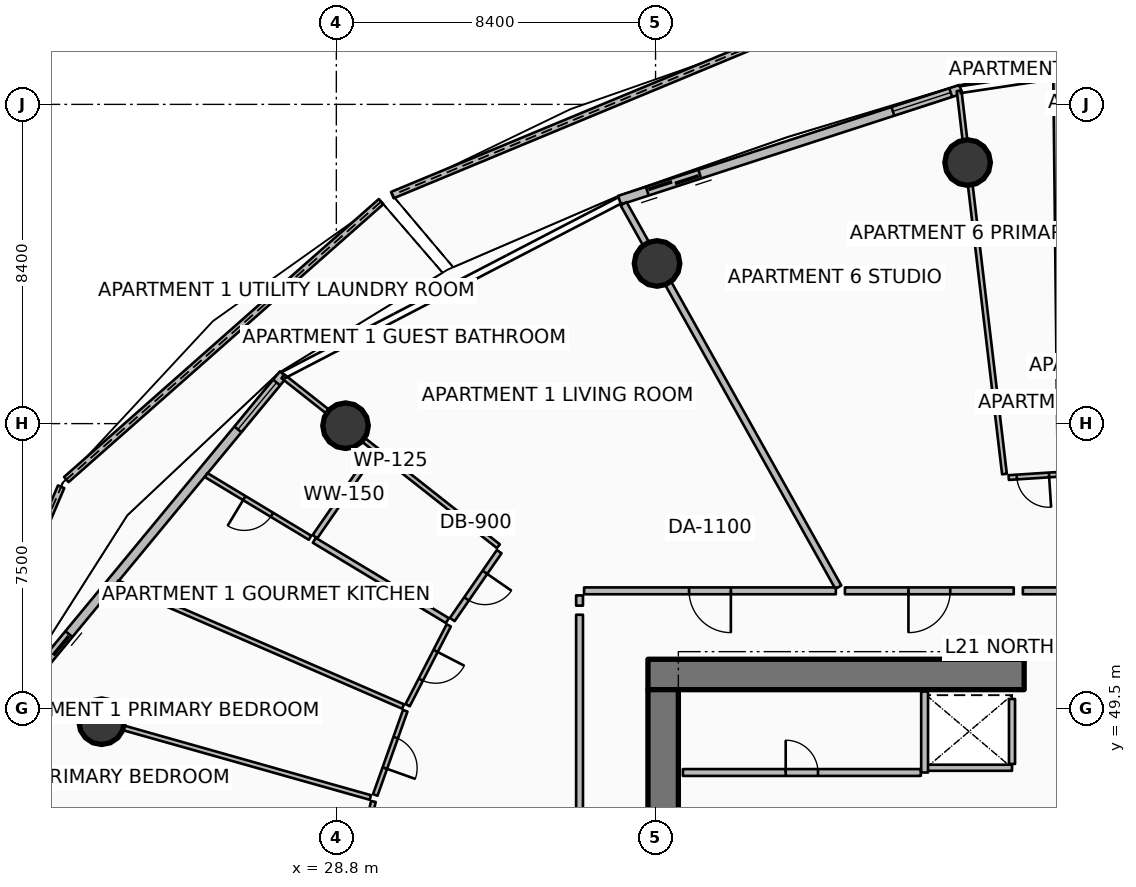
"""IFC4 building model, lengths in metres.
Left out: names, types, materials, properties, quantities, classifications, styles, units other than length and angle.
Written with IfcOpenShell. Run it as: python <this file> out.ifc"""

import sys

from ifc_helpers import new_model, si_unit, direction, frame, frame_2d, origin, origin_2d, place, context, subcontext, project, spatial, polyline, rectangle, circle, outline, extrude, element, fill, save


model = new_model("IFC4")
c1 = context("Model", 3, precision=1e-05, world=origin(), true_north=direction((0.0, 1.0)))
c2 = subcontext(c1, "Body", "Model", "MODEL_VIEW")
j1 = project(units=[si_unit("LENGTHUNIT", "METRE"), si_unit("PLANEANGLEUNIT", "RADIAN")], contexts=[c1])
p1 = place(None, origin())
s1 = spatial("IfcSite", under=j1, at=p1, CompositionType="ELEMENT")
p2 = place(p1, origin())
s2 = spatial("IfcBuilding", under=s1, at=p2, CompositionType="ELEMENT")
p3 = place(p2, frame((0.0, 0.0, 86.4)))
s3 = spatial("IfcBuildingStorey", under=s2, at=p3, CompositionType="ELEMENT", Elevation=86.4)
p4 = place(p3, frame((37.0, 50.4, 0.0), z_axis=(0.0, 0.0, 1.0), x_axis=(1.0, 0.0, 0.0)))
e1 = element("IfcWall", 1, at=p4, inside=s3, PredefinedType="SHEAR", context=c2, shape_type="SweptSolid", body=[
    extrude(rectangle(XDim=9.9, YDim=0.8, at=frame_2d((4.95, 0.0))), origin(), (0.0, 0.0, 1.0), 3.75),
])
p5 = place(p3, frame((37.4, 34.0, 0.0), z_axis=(0.0, 0.0, 1.0), x_axis=(0.0, 1.0, 0.0)))
e2 = element("IfcWall", 2, at=p5, inside=s3, PredefinedType="SHEAR", context=c2, shape_type="SweptSolid", body=[
    extrude(rectangle(XDim=16.0, YDim=0.8, at=frame_2d((8.0, 0.0))), origin(), (0.0, 0.0, 1.0), 3.75),
])
for number, where, z_axis, x_axis in (
    (3, (45.412, 63.869, 0.0), (0.0, 0.0, 1.0), (1.0, 0.0, 0.0)),
    (4, (37.24, 61.214, 0.0), (0.0, 0.0, 1.0), (1.0, 0.0, 0.0)),
    (5, (29.042, 56.945, 0.0), (0.0, 0.0, 1.0), (1.0, 0.0, 0.0)),
    (6, (22.623, 49.157, 0.0), (0.0, 0.0, 1.0), (1.0, 0.0, 0.0)),
):
    element("IfcColumn", number, at=place(p3, frame(where, z_axis=z_axis, x_axis=x_axis)), inside=s3, PredefinedType="COLUMN", context=c2, shape_type="SweptSolid", body=[
        extrude(circle(Radius=0.6, at=origin_2d()), origin(), (0.0, 0.0, 1.0), 3.5),
    ])
p6 = place(p3, frame((39.767, 66.95, 0.0), z_axis=(0.0, 0.0, 1.0), x_axis=(-0.92370541506, -0.383103518894, 0.0)))
e7 = element("IfcWall", 7, at=p6, inside=s3, PredefinedType="PARAPET", context=c2, shape_type="SweptSolid", body=[
    extrude(outline(polyline([(0.0, 0.0), (10.277, 0.0), (10.277, 1.756), (5.139, 1.853), (0.0, 1.832), (0.0, 0.0)])), frame((0.0, 0.09, 0.0), z_axis=(0.0, -1.0, 0.0), x_axis=(1.0, 0.0, 0.0)), (0.0, 0.0, 1.0), 0.18),
])
p7 = place(p3, frame((29.978, 62.842, 0.0), z_axis=(0.0, 0.0, 1.0), x_axis=(-0.749623748339, -0.661864212604, 0.0)))
e8 = element("IfcWall", 8, at=p7, inside=s3, PredefinedType="PARAPET", context=c2, shape_type="SweptSolid", body=[
    extrude(outline(polyline([(0.0, 0.0), (11.05, 0.0), (11.05, 1.348), (5.525, 1.562), (0.0, 1.747), (0.0, 0.0)])), frame((0.0, 0.09, 0.0), z_axis=(0.0, -1.0, 0.0), x_axis=(1.0, 0.0, 0.0)), (0.0, 0.0, 1.0), 0.18),
])
p8 = place(p3, frame((21.558, 55.338, 0.0), z_axis=(0.0, 0.0, 1.0), x_axis=(-0.391761113394, -0.920066970406, 0.0)))
e9 = element("IfcWall", 9, at=p8, inside=s3, PredefinedType="PARAPET", context=c2, shape_type="SweptSolid", body=[
    extrude(outline(polyline([(0.0, 0.0), (11.638, 0.0), (11.638, 1.12), (5.819, 1.182), (0.0, 1.348), (0.0, 0.0)])), frame((0.0, 0.09, 0.0), z_axis=(0.0, -1.0, 0.0), x_axis=(1.0, 0.0, 0.0)), (0.0, 0.0, 1.0), 0.18),
])
p9 = place(p3, frame((45.233, 65.797, 0.0), z_axis=(0.0, 0.0, 1.0), x_axis=(-0.951052494852, -0.30902937083, 0.0)))
e10 = element("IfcWall", 10, at=p9, inside=s3, PredefinedType="SOLIDWALL", context=c2, shape_type="SweptSolid", body=[
    extrude(rectangle(XDim=9.444, YDim=0.24, at=frame_2d((4.722, 0.0))), origin(), (0.0, 0.0, 1.0), 2.45),
])
p10 = place(p9, frame((7.224, 0.0, 0.0)))
e11 = element("IfcOpeningElement", 11, at=p10, cuts=e10, PredefinedType="OPENING", context=c2, shape_type="SweptSolid", body=[
    extrude(rectangle(XDim=1.45, YDim=2.15, at=frame_2d((0.725, 1.075))), frame((0.0, 0.13, 0.0), z_axis=(0.0, -1.0, 0.0), x_axis=(1.0, 0.0, 0.0)), (0.0, 0.0, 1.0), 0.26),
])
p11 = place(p9, frame((0.28, 0.0, 0.65)))
e12 = element("IfcOpeningElement", 12, at=p11, cuts=e10, PredefinedType="OPENING", context=c2, shape_type="SweptSolid", body=[
    extrude(rectangle(XDim=1.6, YDim=1.5, at=frame_2d((0.8, 0.75))), frame((0.0, 0.13, 0.0), z_axis=(0.0, -1.0, 0.0), x_axis=(1.0, 0.0, 0.0)), (0.0, 0.0, 1.0), 0.26),
])
p12 = place(p3, frame((27.407, 58.298, 0.0), z_axis=(0.0, 0.0, 1.0), x_axis=(-0.636704975, -0.771107498868, 0.0)))
e13 = element("IfcWall", 13, at=p12, inside=s3, PredefinedType="SOLIDWALL", context=c2, shape_type="SweptSolid", body=[
    extrude(rectangle(XDim=11.084, YDim=0.24, at=frame_2d((5.542, 0.0))), origin(), (0.0, 0.0, 1.0), 2.45),
])
p13 = place(p12, frame((8.864, 0.0, 0.0)))
e14 = element("IfcOpeningElement", 14, at=p13, cuts=e13, PredefinedType="OPENING", context=c2, shape_type="SweptSolid", body=[
    extrude(rectangle(XDim=1.45, YDim=2.15, at=frame_2d((0.725, 1.075))), frame((0.0, 0.13, 0.0), z_axis=(0.0, -1.0, 0.0), x_axis=(1.0, 0.0, 0.0)), (0.0, 0.0, 1.0), 0.26),
])
p14 = place(p12, frame((0.28, 0.0, 0.65)))
e15 = element("IfcOpeningElement", 15, at=p14, cuts=e13, PredefinedType="OPENING", context=c2, shape_type="SweptSolid", body=[
    extrude(rectangle(XDim=1.6, YDim=1.5, at=frame_2d((0.8, 0.75))), frame((0.0, 0.13, 0.0), z_axis=(0.0, -1.0, 0.0), x_axis=(1.0, 0.0, 0.0)), (0.0, 0.0, 1.0), 0.26),
])
p15 = place(p3, frame((46.58, 47.945, 0.0), z_axis=(0.0, 0.0, 1.0), x_axis=(-1.0, 0.0, 0.0)))
e16 = element("IfcWall", 16, at=p15, inside=s3, PredefinedType="PARTITIONING", context=c2, shape_type="SweptSolid", body=[
    extrude(rectangle(XDim=2.26, YDim=0.16, at=frame_2d((1.13, 0.0))), origin(), (0.0, 0.0, 1.0), 3.5),
])
p16 = place(p3, frame((46.58, 48.045, 0.0), z_axis=(0.0, 0.0, 1.0), x_axis=(0.0, 1.0, 0.0)))
e17 = element("IfcWall", 17, at=p16, inside=s3, PredefinedType="PARTITIONING", context=c2, shape_type="SweptSolid", body=[
    extrude(rectangle(XDim=1.71, YDim=0.16, at=frame_2d((0.855, 0.0))), origin(), (0.0, 0.0, 1.0), 3.5),
])
p17 = place(p3, frame((37.92, 47.82, 0.0), z_axis=(0.0, 0.0, 1.0), x_axis=(1.0, 0.0, 0.0)))
e18 = element("IfcWall", 18, at=p17, inside=s3, PredefinedType="PARTITIONING", context=c2, shape_type="SweptSolid", body=[
    extrude(rectangle(XDim=6.26, YDim=0.18, at=frame_2d((3.13, 0.0))), origin(), (0.0, 0.0, 1.0), 3.5),
])
p18 = place(p17, frame((2.705, 0.0, 0.0)))
e19 = element("IfcOpeningElement", 19, at=p18, cuts=e18, PredefinedType="OPENING", context=c2, shape_type="SweptSolid", body=[
    extrude(rectangle(XDim=0.85, YDim=2.06, at=frame_2d((0.425, 1.03))), frame((0.0, 0.1, 0.0), z_axis=(0.0, -1.0, 0.0), x_axis=(1.0, 0.0, 0.0)), (0.0, 0.0, 1.0), 0.2),
])
p19 = place(p3, frame((44.28, 47.82, 0.0), z_axis=(0.0, 0.0, 1.0), x_axis=(0.0, 1.0, 0.0)))
e20 = element("IfcWall", 20, at=p19, inside=s3, PredefinedType="PARTITIONING", context=c2, shape_type="SweptSolid", body=[
    extrude(rectangle(XDim=2.13, YDim=0.18, at=frame_2d((1.065, 0.0))), origin(), (0.0, 0.0, 1.0), 3.5),
])
p20 = place(p3, frame((42.01, 52.696, 0.0), z_axis=(0.0, 0.0, 1.0), x_axis=(-0.488628442553, 0.872491974249, 0.0)))
e21 = element("IfcWall", 21, at=p20, inside=s3, PredefinedType="PARTITIONING", context=c2, shape_type="SweptSolid", body=[
    extrude(rectangle(XDim=11.563, YDim=0.18, at=frame_2d((5.782, 0.0))), origin(), (0.0, 0.0, 1.0), 2.94),
])
p21 = place(p3, frame((41.944, 52.6, 0.0), z_axis=(0.0, 0.0, 1.0), x_axis=(-1.0, 0.0, 0.0)))
e22 = element("IfcWall", 22, at=p21, inside=s3, PredefinedType="PARTITIONING", context=c2, shape_type="SweptSolid", body=[
    extrude(rectangle(XDim=6.624, YDim=0.18, at=frame_2d((3.312, 0.0))), origin(), (0.0, 0.0, 1.0), 2.94),
])
p22 = place(p21, frame((2.762, 0.0, 0.0)))
e23 = element("IfcOpeningElement", 23, at=p22, cuts=e22, PredefinedType="OPENING", context=c2, shape_type="SweptSolid", body=[
    extrude(rectangle(XDim=1.1, YDim=2.1, at=frame_2d((0.55, 1.05))), frame((0.0, 0.1, 0.0), z_axis=(0.0, -1.0, 0.0), x_axis=(1.0, 0.0, 0.0)), (0.0, 0.0, 1.0), 0.2),
])
p23 = place(p3, frame((35.2, 52.48, 0.0), z_axis=(0.0, 0.0, 1.0), x_axis=(0.0, -1.0, 0.0)))
e24 = element("IfcWall", 24, at=p23, inside=s3, PredefinedType="PARTITIONING", context=c2, shape_type="SweptSolid", body=[
    extrude(rectangle(XDim=0.269, YDim=0.18, at=frame_2d((0.135, 0.0))), origin(), (0.0, 0.0, 1.0), 2.94),
])
p24 = place(p3, frame((35.2, 51.971, 0.0), z_axis=(0.0, 0.0, 1.0), x_axis=(0.0, -1.0, 0.0)))
e25 = element("IfcWall", 25, at=p24, inside=s3, PredefinedType="PARTITIONING", context=c2, shape_type="SweptSolid", body=[
    extrude(rectangle(XDim=6.241, YDim=0.18, at=frame_2d((3.12, 0.0))), origin(), (0.0, 0.0, 1.0), 2.94),
])
p25 = place(p3, frame((33.064, 53.774, 0.0), z_axis=(0.0, 0.0, 1.0), x_axis=(-0.785299836557, 0.61911563274, 0.0)))
e26 = element("IfcWall", 26, at=p25, inside=s3, PredefinedType="PARTITIONING", context=c2, shape_type="SweptSolid", body=[
    extrude(rectangle(XDim=7.219, YDim=0.125, at=frame_2d((3.61, 0.0))), origin(), (0.0, 0.0, 1.0), 2.94),
])
p26 = place(p3, frame((33.086, 53.63, 0.0), z_axis=(0.0, 0.0, 1.0), x_axis=(-0.568917555875, -0.822394561398, 0.0)))
e27 = element("IfcWall", 27, at=p26, inside=s3, PredefinedType="PARTITIONING", context=c2, shape_type="SweptSolid", body=[
    extrude(rectangle(XDim=2.171, YDim=0.15, at=frame_2d((1.085, 0.0))), origin(), (0.0, 0.0, 1.0), 2.94),
])
p27 = place(p26, frame((0.66, 0.0, 0.0)))
e28 = element("IfcOpeningElement", 28, at=p27, cuts=e27, PredefinedType="OPENING", context=c2, shape_type="SweptSolid", body=[
    extrude(rectangle(XDim=0.85, YDim=2.06, at=frame_2d((0.425, 1.03))), frame((0.0, 0.085, 0.0), z_axis=(0.0, -1.0, 0.0), x_axis=(1.0, 0.0, 0.0)), (0.0, 0.0, 1.0), 0.17),
])
p28 = place(p3, frame((29.772, 56.243, 0.0), z_axis=(0.0, 0.0, 1.0), x_axis=(-0.568904038121, -0.822403912569, 0.0)))
e29 = element("IfcWall", 29, at=p28, inside=s3, PredefinedType="PARTITIONING", context=c2, shape_type="SweptSolid", body=[
    extrude(rectangle(XDim=2.698, YDim=0.15, at=frame_2d((1.349, 0.0))), origin(), (0.0, 0.0, 1.0), 2.94),
])
p29 = place(p3, frame((31.722, 51.817, 0.0), z_axis=(0.0, 0.0, 1.0), x_axis=(-0.856305556185, 0.516469548422, 0.0)))
e30 = element("IfcWall", 30, at=p29, inside=s3, PredefinedType="PARTITIONING", context=c2, shape_type="SweptSolid", body=[
    extrude(rectangle(XDim=4.09, YDim=0.15, at=frame_2d((2.045, 0.0))), origin(), (0.0, 0.0, 1.0), 2.94),
])
p30 = place(p3, frame((28.109, 53.997, 0.0), z_axis=(0.0, 0.0, 1.0), x_axis=(-0.856309036054, 0.516463778761, 0.0)))
e31 = element("IfcWall", 31, at=p30, inside=s3, PredefinedType="PARTITIONING", context=c2, shape_type="SweptSolid", body=[
    extrude(rectangle(XDim=3.19, YDim=0.125, at=frame_2d((1.595, 0.0))), origin(), (0.0, 0.0, 1.0), 2.94),
])
p31 = place(p30, frame((1.17, 0.0, 0.0)))
e32 = element("IfcOpeningElement", 32, at=p31, cuts=e31, PredefinedType="OPENING", context=c2, shape_type="SweptSolid", body=[
    extrude(rectangle(XDim=0.85, YDim=2.06, at=frame_2d((0.425, 1.03))), frame((0.0, 0.073, 0.0), z_axis=(0.0, -1.0, 0.0), x_axis=(1.0, 0.0, 0.0)), (0.0, 0.0, 1.0), 0.145),
])
p32 = place(p3, frame((30.557, 49.556, 0.0), z_axis=(0.0, 0.0, 1.0), x_axis=(-0.917609944695, 0.39748206173, 0.0)))
e33 = element("IfcWall", 33, at=p32, inside=s3, PredefinedType="PARTITIONING", context=c2, shape_type="SweptSolid", body=[
    extrude(rectangle(XDim=8.197, YDim=0.125, at=frame_2d((4.099, 0.0))), origin(), (0.0, 0.0, 1.0), 2.94),
])
p33 = place(p3, frame((31.758, 51.691, 0.0), z_axis=(0.0, 0.0, 1.0), x_axis=(-0.458055610994, -0.888923538465, 0.0)))
e34 = element("IfcWall", 34, at=p33, inside=s3, PredefinedType="PARTITIONING", context=c2, shape_type="SweptSolid", body=[
    extrude(rectangle(XDim=2.362, YDim=0.125, at=frame_2d((1.181, 0.0))), origin(), (0.0, 0.0, 1.0), 2.94),
])
p34 = place(p33, frame((0.756, 0.0, 0.0)))
e35 = element("IfcOpeningElement", 35, at=p34, cuts=e34, PredefinedType="OPENING", context=c2, shape_type="SweptSolid", body=[
    extrude(rectangle(XDim=0.85, YDim=2.06, at=frame_2d((0.425, 1.03))), frame((0.0, 0.073, 0.0), z_axis=(0.0, -1.0, 0.0), x_axis=(1.0, 0.0, 0.0)), (0.0, 0.0, 1.0), 0.145),
])
p35 = place(p3, frame((30.613, 49.445, 0.0), z_axis=(0.0, 0.0, 1.0), x_axis=(-0.335316857021, -0.94210541098, 0.0)))
e36 = element("IfcWall", 36, at=p35, inside=s3, PredefinedType="PARTITIONING", context=c2, shape_type="SweptSolid", body=[
    extrude(rectangle(XDim=2.352, YDim=0.125, at=frame_2d((1.176, 0.0))), origin(), (0.0, 0.0, 1.0), 2.94),
])
p36 = place(p35, frame((0.751, 0.0, 0.0)))
e37 = element("IfcOpeningElement", 37, at=p36, cuts=e36, PredefinedType="OPENING", context=c2, shape_type="SweptSolid", body=[
    extrude(rectangle(XDim=0.85, YDim=2.06, at=frame_2d((0.425, 1.03))), frame((0.0, 0.073, 0.0), z_axis=(0.0, -1.0, 0.0), x_axis=(1.0, 0.0, 0.0)), (0.0, 0.0, 1.0), 0.145),
])
p37 = place(p3, frame((29.695, 47.163, 0.0), z_axis=(0.0, 0.0, 1.0), x_axis=(-0.962455839824, 0.271438310467, 0.0)))
e38 = element("IfcWall", 38, at=p37, inside=s3, PredefinedType="PARTITIONING", context=c2, shape_type="SweptSolid", body=[
    extrude(rectangle(XDim=9.552, YDim=0.125, at=frame_2d((4.776, 0.0))), origin(), (0.0, 0.0, 1.0), 2.94),
])
p38 = place(p3, frame((29.774, 47.057, 0.0), z_axis=(0.0, 0.0, 1.0), x_axis=(-0.210439442073, -0.977606895035, 0.0)))
e39 = element("IfcWall", 39, at=p38, inside=s3, PredefinedType="PARTITIONING", context=c2, shape_type="SweptSolid", body=[
    extrude(rectangle(XDim=2.216, YDim=0.125, at=frame_2d((1.108, 0.0))), origin(), (0.0, 0.0, 1.0), 2.94),
])
p39 = place(p38, frame((0.683, 0.0, 0.0)))
e40 = element("IfcOpeningElement", 40, at=p39, cuts=e39, PredefinedType="OPENING", context=c2, shape_type="SweptSolid", body=[
    extrude(rectangle(XDim=0.85, YDim=2.06, at=frame_2d((0.425, 1.03))), frame((0.0, 0.073, 0.0), z_axis=(0.0, -1.0, 0.0), x_axis=(1.0, 0.0, 0.0)), (0.0, 0.0, 1.0), 0.145),
])
p40 = place(p3, frame((46.625, 52.6, 0.0), z_axis=(0.0, 0.0, 1.0), x_axis=(-1.0, 0.0, 0.0)))
e41 = element("IfcWall", 41, at=p40, inside=s3, PredefinedType="PARTITIONING", context=c2, shape_type="SweptSolid", body=[
    extrude(rectangle(XDim=4.442, YDim=0.18, at=frame_2d((2.221, 0.0))), origin(), (0.0, 0.0, 1.0), 2.94),
])
p41 = place(p40, frame((1.671, 0.0, 0.0)))
e42 = element("IfcOpeningElement", 42, at=p41, cuts=e41, PredefinedType="OPENING", context=c2, shape_type="SweptSolid", body=[
    extrude(rectangle(XDim=1.1, YDim=2.1, at=frame_2d((0.55, 1.05))), frame((0.0, 0.1, 0.0), z_axis=(0.0, -1.0, 0.0), x_axis=(1.0, 0.0, 0.0)), (0.0, 0.0, 1.0), 0.2),
])
p42 = place(p3, frame((50.869, 52.6, 0.0), z_axis=(0.0, 0.0, 1.0), x_axis=(-1.0, 0.0, 0.0)))
e43 = element("IfcWall", 43, at=p42, inside=s3, PredefinedType="PARTITIONING", context=c2, shape_type="SweptSolid", body=[
    extrude(rectangle(XDim=4.004, YDim=0.18, at=frame_2d((2.002, 0.0))), origin(), (0.0, 0.0, 1.0), 2.94),
])
p43 = place(p3, frame((46.382, 55.674, 0.0), z_axis=(0.0, 0.0, 1.0), x_axis=(-0.117533197276, 0.99306895407, 0.0)))
e44 = element("IfcWall", 44, at=p43, inside=s3, PredefinedType="PARTITIONING", context=c2, shape_type="SweptSolid", body=[
    extrude(rectangle(XDim=10.153, YDim=0.125, at=frame_2d((5.077, 0.0))), origin(), (0.0, 0.0, 1.0), 2.94),
])
p44 = place(p3, frame((47.845, 55.758, 0.0), z_axis=(0.0, 0.0, 1.0), x_axis=(-0.011264572172, 0.999936552694, 0.0)))
e45 = element("IfcWall", 45, at=p44, inside=s3, PredefinedType="PARTITIONING", context=c2, shape_type="SweptSolid", body=[
    extrude(rectangle(XDim=10.382, YDim=0.125, at=frame_2d((5.191, 0.0))), origin(), (0.0, 0.0, 1.0), 2.94),
])
p45 = place(p3, frame((47.766, 55.663, 0.0), z_axis=(0.0, 0.0, 1.0), x_axis=(-0.997930857608, -0.064296216329, 0.0)))
e46 = element("IfcWall", 46, at=p45, inside=s3, PredefinedType="PARTITIONING", context=c2, shape_type="SweptSolid", body=[
    extrude(rectangle(XDim=1.276, YDim=0.125, at=frame_2d((0.638, 0.0))), origin(), (0.0, 0.0, 1.0), 2.94),
])
p46 = place(p45, frame((0.213, 0.0, 0.0)))
e47 = element("IfcOpeningElement", 47, at=p46, cuts=e46, PredefinedType="OPENING", context=c2, shape_type="SweptSolid", body=[
    extrude(rectangle(XDim=0.85, YDim=2.06, at=frame_2d((0.425, 1.03))), frame((0.0, 0.073, 0.0), z_axis=(0.0, -1.0, 0.0), x_axis=(1.0, 0.0, 0.0)), (0.0, 0.0, 1.0), 0.145),
])
p47 = place(p10, origin())
e48 = element("IfcDoor", 48, at=p47, inside=s3, OperationType="DOUBLE_DOOR_SLIDING", PredefinedType="DOOR", context=c2, shape_type="SweptSolid", body=[
    extrude(rectangle(XDim=1.45, YDim=2.15, at=frame_2d((0.725, 1.075))), frame((0.0, 0.025, 0.0), z_axis=(0.0, -1.0, 0.0), x_axis=(1.0, 0.0, 0.0)), (0.0, 0.0, 1.0), 0.05),
])
fill(e11, e48)
p48 = place(p11, origin())
e49 = element("IfcWindow", 49, at=p48, inside=s3, PartitioningType="SINGLE_PANEL", PredefinedType="WINDOW", context=c2, shape_type="SweptSolid", body=[
    extrude(rectangle(XDim=1.6, YDim=1.5, at=frame_2d((0.8, 0.75))), frame((0.0, 0.03, 0.0), z_axis=(0.0, -1.0, 0.0), x_axis=(1.0, 0.0, 0.0)), (0.0, 0.0, 1.0), 0.06),
])
fill(e12, e49)
p49 = place(p13, origin())
e50 = element("IfcDoor", 50, at=p49, inside=s3, OperationType="DOUBLE_DOOR_SLIDING", PredefinedType="DOOR", context=c2, shape_type="SweptSolid", body=[
    extrude(rectangle(XDim=1.45, YDim=2.15, at=frame_2d((0.725, 1.075))), frame((0.0, 0.025, 0.0), z_axis=(0.0, -1.0, 0.0), x_axis=(1.0, 0.0, 0.0)), (0.0, 0.0, 1.0), 0.05),
])
fill(e14, e50)
p50 = place(p14, origin())
e51 = element("IfcWindow", 51, at=p50, inside=s3, PartitioningType="SINGLE_PANEL", PredefinedType="WINDOW", context=c2, shape_type="SweptSolid", body=[
    extrude(rectangle(XDim=1.6, YDim=1.5, at=frame_2d((0.8, 0.75))), frame((0.0, 0.03, 0.0), z_axis=(0.0, -1.0, 0.0), x_axis=(1.0, 0.0, 0.0)), (0.0, 0.0, 1.0), 0.06),
])
fill(e15, e51)
p51 = place(p18, origin())
e52 = element("IfcDoor", 52, at=p51, inside=s3, OperationType="SINGLE_SWING_LEFT", PredefinedType="DOOR", context=c2, shape_type="SweptSolid", body=[
    extrude(rectangle(XDim=0.85, YDim=2.06, at=frame_2d((0.425, 1.03))), frame((0.0, 0.025, 0.0), z_axis=(0.0, -1.0, 0.0), x_axis=(1.0, 0.0, 0.0)), (0.0, 0.0, 1.0), 0.05),
])
fill(e19, e52)
p52 = place(p22, origin())
e53 = element("IfcDoor", 53, at=p52, inside=s3, OperationType="SINGLE_SWING_LEFT", PredefinedType="DOOR", context=c2, shape_type="SweptSolid", body=[
    extrude(rectangle(XDim=1.1, YDim=2.1, at=frame_2d((0.55, 1.05))), frame((0.0, 0.025, 0.0), z_axis=(0.0, -1.0, 0.0), x_axis=(1.0, 0.0, 0.0)), (0.0, 0.0, 1.0), 0.05),
])
fill(e23, e53)
p53 = place(p27, origin())
e54 = element("IfcDoor", 54, at=p53, inside=s3, OperationType="SINGLE_SWING_LEFT", PredefinedType="DOOR", context=c2, shape_type="SweptSolid", body=[
    extrude(rectangle(XDim=0.85, YDim=2.06, at=frame_2d((0.425, 1.03))), frame((0.0, 0.025, 0.0), z_axis=(0.0, -1.0, 0.0), x_axis=(1.0, 0.0, 0.0)), (0.0, 0.0, 1.0), 0.05),
])
fill(e28, e54)
p54 = place(p31, origin())
e55 = element("IfcDoor", 55, at=p54, inside=s3, OperationType="SINGLE_SWING_RIGHT", PredefinedType="DOOR", context=c2, shape_type="SweptSolid", body=[
    extrude(rectangle(XDim=0.85, YDim=2.06, at=frame_2d((0.425, 1.03))), frame((0.0, 0.025, 0.0), z_axis=(0.0, -1.0, 0.0), x_axis=(1.0, 0.0, 0.0)), (0.0, 0.0, 1.0), 0.05),
])
fill(e32, e55)
p55 = place(p34, origin())
e56 = element("IfcDoor", 56, at=p55, inside=s3, OperationType="SINGLE_SWING_LEFT", PredefinedType="DOOR", context=c2, shape_type="SweptSolid", body=[
    extrude(rectangle(XDim=0.85, YDim=2.06, at=frame_2d((0.425, 1.03))), frame((0.0, 0.025, 0.0), z_axis=(0.0, -1.0, 0.0), x_axis=(1.0, 0.0, 0.0)), (0.0, 0.0, 1.0), 0.05),
])
fill(e35, e56)
p56 = place(p36, origin())
e57 = element("IfcDoor", 57, at=p56, inside=s3, OperationType="SINGLE_SWING_RIGHT", PredefinedType="DOOR", context=c2, shape_type="SweptSolid", body=[
    extrude(rectangle(XDim=0.85, YDim=2.06, at=frame_2d((0.425, 1.03))), frame((0.0, 0.025, 0.0), z_axis=(0.0, -1.0, 0.0), x_axis=(1.0, 0.0, 0.0)), (0.0, 0.0, 1.0), 0.05),
])
fill(e37, e57)
p57 = place(p41, origin())
e58 = element("IfcDoor", 58, at=p57, inside=s3, OperationType="SINGLE_SWING_RIGHT", PredefinedType="DOOR", context=c2, shape_type="SweptSolid", body=[
    extrude(rectangle(XDim=1.1, YDim=2.1, at=frame_2d((0.55, 1.05))), frame((0.0, 0.025, 0.0), z_axis=(0.0, -1.0, 0.0), x_axis=(1.0, 0.0, 0.0)), (0.0, 0.0, 1.0), 0.05),
])
fill(e42, e58)
p58 = place(p46, origin())
e59 = element("IfcDoor", 59, at=p58, inside=s3, OperationType="SINGLE_SWING_LEFT", PredefinedType="DOOR", context=c2, shape_type="SweptSolid", body=[
    extrude(rectangle(XDim=0.85, YDim=2.06, at=frame_2d((0.425, 1.03))), frame((0.0, 0.025, 0.0), z_axis=(0.0, -1.0, 0.0), x_axis=(1.0, 0.0, 0.0)), (0.0, 0.0, 1.0), 0.05),
])
fill(e47, e59)
save(model, sys.argv[1])
